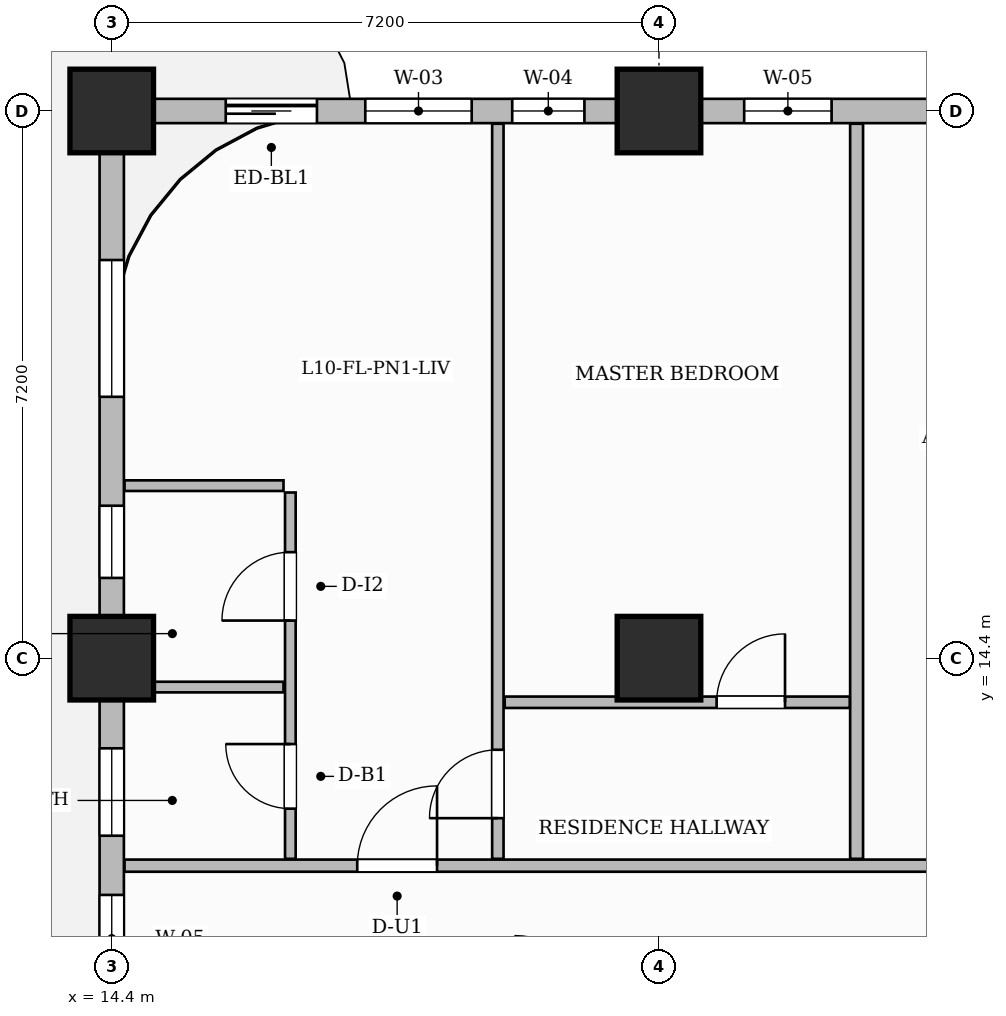
"""IFC4 building model, lengths in metres.
Left out: names, types, materials, properties, quantities, classifications, styles, units other than length and angle.
Written with IfcOpenShell. Run it as: python <this file> out.ifc"""

import sys

from ifc_helpers import new_model, si_unit, direction, frame, frame_2d, origin, origin_2d, place, context, subcontext, project, spatial, rectangle, extrude, source, transform, mapped, element, fill, save


model = new_model("IFC4")
c1 = context("Model", 3, precision=1e-05, world=origin(), true_north=direction((0.0, 1.0)))
c2 = subcontext(c1, "Body", "Model", "MODEL_VIEW")
j1 = project(units=[si_unit("LENGTHUNIT", "METRE"), si_unit("PLANEANGLEUNIT", "RADIAN")], contexts=[c1])
p1 = place(None, origin())
s1 = spatial("IfcSite", under=j1, at=p1, CompositionType="ELEMENT")
p2 = place(p1, origin())
s2 = spatial("IfcBuilding", under=s1, at=p2, CompositionType="ELEMENT")
p3 = place(p2, frame((0.0, 0.0, 47.2)))
s3 = spatial("IfcBuildingStorey", under=s2, at=p3, CompositionType="ELEMENT", Elevation=47.2)
m1 = source(origin(), c2, "Body", "SweptSolid", [
    extrude(rectangle(XDim=1.1, YDim=1.1, at=origin_2d()), origin(), (0.0, 0.0, 1.0), 3.7),
])
for number, where, z_axis, x_axis in (
    (1, (14.4, 14.4, 0.0), (0.0, 0.0, 1.0), (1.0, 0.0, 0.0)),
    (2, (14.4, 21.6, 0.0), (0.0, 0.0, 1.0), (1.0, 0.0, 0.0)),
    (3, (21.6, 14.4, 0.0), (0.0, 0.0, 1.0), (1.0, 0.0, 0.0)),
    (4, (21.6, 21.6, 0.0), (0.0, 0.0, 1.0), (1.0, 0.0, 0.0)),
):
    element("IfcColumn", number, at=place(p3, frame(where, z_axis=z_axis, x_axis=x_axis)), inside=s3, PredefinedType="COLUMN", context=c2, shape_type="MappedRepresentation", body=[
        mapped(m1, transform((0.0, 0.0, 0.0), scale=1.0)),
    ])
p4 = place(p3, frame((14.568, 11.67, 0.0), z_axis=(0.0, 0.0, 1.0), x_axis=(1.0, 0.0, 0.0)))
e5 = element("IfcWall", 5, at=p4, inside=s3, PredefinedType="PARTITIONING", context=c2, shape_type="SweptSolid", body=[
    extrude(rectangle(XDim=15.542, YDim=0.16, at=frame_2d((7.771, 0.0))), origin(), (0.0, 0.0, 1.0), 3.45),
])
p5 = place(p4, frame((3.062, 0.0, 0.0)))
e6 = element("IfcOpeningElement", 6, at=p5, cuts=e5, PredefinedType="OPENING", context=c2, shape_type="SweptSolid", body=[
    extrude(rectangle(XDim=1.05, YDim=2.25, at=frame_2d((0.525, 1.125))), frame((0.0, 0.09, 0.0), z_axis=(0.0, -1.0, 0.0), x_axis=(1.0, 0.0, 0.0)), (0.0, 0.0, 1.0), 0.18),
])
p6 = place(p4, frame((11.932, 0.0, 0.0)))
e7 = element("IfcOpeningElement", 7, at=p6, cuts=e5, PredefinedType="OPENING", context=c2, shape_type="SweptSolid", body=[
    extrude(rectangle(XDim=1.4, YDim=2.35, at=frame_2d((0.7, 1.175))), frame((0.0, 0.09, 0.0), z_axis=(0.0, -1.0, 0.0), x_axis=(1.0, 0.0, 0.0)), (0.0, 0.0, 1.0), 0.18),
])
p7 = place(p3, frame((24.2, 11.76, 0.0), z_axis=(0.0, 0.0, 1.0), x_axis=(0.0, 1.0, 0.0)))
e8 = element("IfcWall", 8, at=p7, inside=s3, PredefinedType="PARTITIONING", context=c2, shape_type="SweptSolid", body=[
    extrude(rectangle(XDim=9.672, YDim=0.17, at=frame_2d((4.836, 0.0))), origin(), (0.0, 0.0, 1.0), 3.45),
])
p8 = place(p3, frame((16.75, 11.76, 0.0), z_axis=(0.0, 0.0, 1.0), x_axis=(0.0, 1.0, 0.0)))
e9 = element("IfcWall", 9, at=p8, inside=s3, PredefinedType="PARTITIONING", context=c2, shape_type="SweptSolid", body=[
    extrude(rectangle(XDim=4.82, YDim=0.14, at=frame_2d((2.41, 0.0))), origin(), (0.0, 0.0, 1.0), 3.45),
])
p9 = place(p8, frame((0.66, 0.0, 0.0)))
e10 = element("IfcOpeningElement", 10, at=p9, cuts=e9, PredefinedType="OPENING", context=c2, shape_type="SweptSolid", body=[
    extrude(rectangle(XDim=0.85, YDim=2.1, at=frame_2d((0.425, 1.05))), frame((0.0, 0.08, 0.0), z_axis=(0.0, -1.0, 0.0), x_axis=(1.0, 0.0, 0.0)), (0.0, 0.0, 1.0), 0.16),
])
p10 = place(p8, frame((3.135, 0.0, 0.0)))
e11 = element("IfcOpeningElement", 11, at=p10, cuts=e9, PredefinedType="OPENING", context=c2, shape_type="SweptSolid", body=[
    extrude(rectangle(XDim=0.9, YDim=2.15, at=frame_2d((0.45, 1.075))), frame((0.0, 0.08, 0.0), z_axis=(0.0, -1.0, 0.0), x_axis=(1.0, 0.0, 0.0)), (0.0, 0.0, 1.0), 0.16),
])
p11 = place(p3, frame((14.59, 14.02, 0.0), z_axis=(0.0, 0.0, 1.0), x_axis=(1.0, 0.0, 0.0)))
e12 = element("IfcWall", 12, at=p11, inside=s3, PredefinedType="PARTITIONING", context=c2, shape_type="SweptSolid", body=[
    extrude(rectangle(XDim=2.07, YDim=0.14, at=frame_2d((1.035, 0.0))), origin(), (0.0, 0.0, 1.0), 3.45),
])
p12 = place(p3, frame((14.568, 16.67, 0.0), z_axis=(0.0, 0.0, 1.0), x_axis=(1.0, 0.0, 0.0)))
e13 = element("IfcWall", 13, at=p12, inside=s3, PredefinedType="PARTITIONING", context=c2, shape_type="SweptSolid", body=[
    extrude(rectangle(XDim=2.092, YDim=0.14, at=frame_2d((1.046, 0.0))), origin(), (0.0, 0.0, 1.0), 3.45),
])
p13 = place(p3, frame((19.48, 11.76, 0.0), z_axis=(0.0, 0.0, 1.0), x_axis=(0.0, 1.0, 0.0)))
e14 = element("IfcWall", 14, at=p13, inside=s3, PredefinedType="PARTITIONING", context=c2, shape_type="SweptSolid", body=[
    extrude(rectangle(XDim=9.672, YDim=0.15, at=frame_2d((4.836, 0.0))), origin(), (0.0, 0.0, 1.0), 3.45),
])
p14 = place(p13, frame((0.535, 0.0, 0.0)))
e15 = element("IfcOpeningElement", 15, at=p14, cuts=e14, PredefinedType="OPENING", context=c2, shape_type="SweptSolid", body=[
    extrude(rectangle(XDim=0.9, YDim=2.15, at=frame_2d((0.45, 1.075))), frame((0.0, 0.085, 0.0), z_axis=(0.0, -1.0, 0.0), x_axis=(1.0, 0.0, 0.0)), (0.0, 0.0, 1.0), 0.17),
])
p15 = place(p3, frame((19.57, 13.82, 0.0), z_axis=(0.0, 0.0, 1.0), x_axis=(1.0, 0.0, 0.0)))
e16 = element("IfcWall", 16, at=p15, inside=s3, PredefinedType="PARTITIONING", context=c2, shape_type="SweptSolid", body=[
    extrude(rectangle(XDim=4.54, YDim=0.15, at=frame_2d((2.27, 0.0))), origin(), (0.0, 0.0, 1.0), 3.45),
])
p16 = place(p15, frame((2.788, 0.0, 0.0)))
e17 = element("IfcOpeningElement", 17, at=p16, cuts=e16, PredefinedType="OPENING", context=c2, shape_type="SweptSolid", body=[
    extrude(rectangle(XDim=0.9, YDim=2.15, at=frame_2d((0.45, 1.075))), frame((0.0, 0.085, 0.0), z_axis=(0.0, -1.0, 0.0), x_axis=(1.0, 0.0, 0.0)), (0.0, 0.0, 1.0), 0.17),
])
p17 = place(p3, frame((14.4, 21.6, 0.0), z_axis=(0.0, 0.0, 1.0), x_axis=(1.0, 0.0, 0.0)))
e18 = element("IfcWall", 18, at=p17, inside=s3, PredefinedType="SOLIDWALL", context=c2, shape_type="SweptSolid", body=[
    extrude(rectangle(XDim=43.2, YDim=0.32, at=frame_2d((21.6, 0.0))), origin(), (0.0, 0.0, 1.0), 2.885),
])
p18 = place(p17, frame((1.5, 0.0, 0.0)))
e19 = element("IfcOpeningElement", 19, at=p18, cuts=e18, PredefinedType="OPENING", context=c2, shape_type="SweptSolid", body=[
    extrude(rectangle(XDim=1.2, YDim=2.2, at=frame_2d((0.6, 1.1))), frame((0.0, 0.17, 0.0), z_axis=(0.0, -1.0, 0.0), x_axis=(1.0, 0.0, 0.0)), (0.0, 0.0, 1.0), 0.34),
])
p19 = place(p17, frame((3.336, 0.0, 0.8)))
e20 = element("IfcOpeningElement", 20, at=p19, cuts=e18, PredefinedType="OPENING", context=c2, shape_type="SweptSolid", body=[
    extrude(rectangle(XDim=1.4, YDim=1.85, at=frame_2d((0.7, 0.925))), frame((0.0, 0.17, 0.0), z_axis=(0.0, -1.0, 0.0), x_axis=(1.0, 0.0, 0.0)), (0.0, 0.0, 1.0), 0.34),
])
p20 = place(p17, frame((5.269, 0.0, 0.8)))
e21 = element("IfcOpeningElement", 21, at=p20, cuts=e18, PredefinedType="OPENING", context=c2, shape_type="SweptSolid", body=[
    extrude(rectangle(XDim=0.95, YDim=1.75, at=frame_2d((0.475, 0.875))), frame((0.0, 0.17, 0.0), z_axis=(0.0, -1.0, 0.0), x_axis=(1.0, 0.0, 0.0)), (0.0, 0.0, 1.0), 0.34),
])
p21 = place(p17, frame((8.321, 0.0, 0.8)))
e22 = element("IfcOpeningElement", 22, at=p21, cuts=e18, PredefinedType="OPENING", context=c2, shape_type="SweptSolid", body=[
    extrude(rectangle(XDim=1.15, YDim=1.8, at=frame_2d((0.575, 0.9))), frame((0.0, 0.17, 0.0), z_axis=(0.0, -1.0, 0.0), x_axis=(1.0, 0.0, 0.0)), (0.0, 0.0, 1.0), 0.34),
])
p22 = place(p17, frame((10.804, 0.0, 0.8)))
e23 = element("IfcOpeningElement", 23, at=p22, cuts=e18, PredefinedType="OPENING", context=c2, shape_type="SweptSolid", body=[
    extrude(rectangle(XDim=1.8, YDim=1.85, at=frame_2d((0.9, 0.925))), frame((0.0, 0.17, 0.0), z_axis=(0.0, -1.0, 0.0), x_axis=(1.0, 0.0, 0.0)), (0.0, 0.0, 1.0), 0.34),
])
p23 = place(p17, frame((16.601, 0.0, 0.8)))
e24 = element("IfcOpeningElement", 24, at=p23, cuts=e18, PredefinedType="OPENING", context=c2, shape_type="SweptSolid", body=[
    extrude(rectangle(XDim=1.8, YDim=1.85, at=frame_2d((0.9, 0.925))), frame((0.0, 0.17, 0.0), z_axis=(0.0, -1.0, 0.0), x_axis=(1.0, 0.0, 0.0)), (0.0, 0.0, 1.0), 0.34),
])
p24 = place(p17, frame((21.723, 0.0, 0.8)))
e25 = element("IfcOpeningElement", 25, at=p24, cuts=e18, PredefinedType="OPENING", context=c2, shape_type="SweptSolid", body=[
    extrude(rectangle(XDim=1.8, YDim=1.85, at=frame_2d((0.9, 0.925))), frame((0.0, 0.17, 0.0), z_axis=(0.0, -1.0, 0.0), x_axis=(1.0, 0.0, 0.0)), (0.0, 0.0, 1.0), 0.34),
])
p25 = place(p17, frame((24.469, 0.0, 0.8)))
e26 = element("IfcOpeningElement", 26, at=p25, cuts=e18, PredefinedType="OPENING", context=c2, shape_type="SweptSolid", body=[
    extrude(rectangle(XDim=1.8, YDim=1.85, at=frame_2d((0.9, 0.925))), frame((0.0, 0.17, 0.0), z_axis=(0.0, -1.0, 0.0), x_axis=(1.0, 0.0, 0.0)), (0.0, 0.0, 1.0), 0.34),
])
p26 = place(p17, frame((29.075, 0.0, 0.8)))
e27 = element("IfcOpeningElement", 27, at=p26, cuts=e18, PredefinedType="OPENING", context=c2, shape_type="SweptSolid", body=[
    extrude(rectangle(XDim=1.8, YDim=1.85, at=frame_2d((0.9, 0.925))), frame((0.0, 0.17, 0.0), z_axis=(0.0, -1.0, 0.0), x_axis=(1.0, 0.0, 0.0)), (0.0, 0.0, 1.0), 0.34),
])
p27 = place(p17, frame((32.125, 0.0, 0.8)))
e28 = element("IfcOpeningElement", 28, at=p27, cuts=e18, PredefinedType="OPENING", context=c2, shape_type="SweptSolid", body=[
    extrude(rectangle(XDim=1.8, YDim=1.85, at=frame_2d((0.9, 0.925))), frame((0.0, 0.17, 0.0), z_axis=(0.0, -1.0, 0.0), x_axis=(1.0, 0.0, 0.0)), (0.0, 0.0, 1.0), 0.34),
])
p28 = place(p17, frame((36.875, 0.0, 0.8)))
e29 = element("IfcOpeningElement", 29, at=p28, cuts=e18, PredefinedType="OPENING", context=c2, shape_type="SweptSolid", body=[
    extrude(rectangle(XDim=1.8, YDim=1.85, at=frame_2d((0.9, 0.925))), frame((0.0, 0.17, 0.0), z_axis=(0.0, -1.0, 0.0), x_axis=(1.0, 0.0, 0.0)), (0.0, 0.0, 1.0), 0.34),
])
p29 = place(p17, frame((39.925, 0.0, 0.8)))
e30 = element("IfcOpeningElement", 30, at=p29, cuts=e18, PredefinedType="OPENING", context=c2, shape_type="SweptSolid", body=[
    extrude(rectangle(XDim=1.8, YDim=1.85, at=frame_2d((0.9, 0.925))), frame((0.0, 0.17, 0.0), z_axis=(0.0, -1.0, 0.0), x_axis=(1.0, 0.0, 0.0)), (0.0, 0.0, 1.0), 0.34),
])
p30 = place(p3, frame((14.4, 0.05, 0.0), z_axis=(0.0, 0.0, 1.0), x_axis=(0.0, 1.0, 0.0)))
e31 = element("IfcWall", 31, at=p30, inside=s3, PredefinedType="SOLIDWALL", context=c2, shape_type="SweptSolid", body=[
    extrude(rectangle(XDim=21.5, YDim=0.32, at=frame_2d((10.75, 0.0))), origin(), (0.0, 0.0, 1.0), 2.885),
])
p31 = place(p30, frame((1.275, 0.0, 0.8)))
e32 = element("IfcOpeningElement", 32, at=p31, cuts=e31, PredefinedType="OPENING", context=c2, shape_type="SweptSolid", body=[
    extrude(rectangle(XDim=1.8, YDim=1.85, at=frame_2d((0.9, 0.925))), frame((0.0, 0.17, 0.0), z_axis=(0.0, -1.0, 0.0), x_axis=(1.0, 0.0, 0.0)), (0.0, 0.0, 1.0), 0.34),
])
p32 = place(p30, frame((4.025, 0.0, 0.8)))
e33 = element("IfcOpeningElement", 33, at=p32, cuts=e31, PredefinedType="OPENING", context=c2, shape_type="SweptSolid", body=[
    extrude(rectangle(XDim=1.8, YDim=1.85, at=frame_2d((0.9, 0.925))), frame((0.0, 0.17, 0.0), z_axis=(0.0, -1.0, 0.0), x_axis=(1.0, 0.0, 0.0)), (0.0, 0.0, 1.0), 0.34),
])
p33 = place(p30, frame((8.246, 0.0, 0.8)))
e34 = element("IfcOpeningElement", 34, at=p33, cuts=e31, PredefinedType="OPENING", context=c2, shape_type="SweptSolid", body=[
    extrude(rectangle(XDim=1.15, YDim=1.8, at=frame_2d((0.575, 0.9))), frame((0.0, 0.17, 0.0), z_axis=(0.0, -1.0, 0.0), x_axis=(1.0, 0.0, 0.0)), (0.0, 0.0, 1.0), 0.34),
])
p34 = place(p30, frame((10.085, 0.0, 0.8)))
e35 = element("IfcOpeningElement", 35, at=p34, cuts=e31, PredefinedType="OPENING", context=c2, shape_type="SweptSolid", body=[
    extrude(rectangle(XDim=1.15, YDim=1.8, at=frame_2d((0.575, 0.9))), frame((0.0, 0.17, 0.0), z_axis=(0.0, -1.0, 0.0), x_axis=(1.0, 0.0, 0.0)), (0.0, 0.0, 1.0), 0.34),
])
p35 = place(p30, frame((12.014, 0.0, 0.8)))
e36 = element("IfcOpeningElement", 36, at=p35, cuts=e31, PredefinedType="OPENING", context=c2, shape_type="SweptSolid", body=[
    extrude(rectangle(XDim=1.15, YDim=1.8, at=frame_2d((0.575, 0.9))), frame((0.0, 0.17, 0.0), z_axis=(0.0, -1.0, 0.0), x_axis=(1.0, 0.0, 0.0)), (0.0, 0.0, 1.0), 0.34),
])
p36 = place(p30, frame((15.406, 0.0, 0.8)))
e37 = element("IfcOpeningElement", 37, at=p36, cuts=e31, PredefinedType="OPENING", context=c2, shape_type="SweptSolid", body=[
    extrude(rectangle(XDim=0.95, YDim=1.75, at=frame_2d((0.475, 0.875))), frame((0.0, 0.17, 0.0), z_axis=(0.0, -1.0, 0.0), x_axis=(1.0, 0.0, 0.0)), (0.0, 0.0, 1.0), 0.34),
])
p37 = place(p30, frame((17.789, 0.0, 0.8)))
e38 = element("IfcOpeningElement", 38, at=p37, cuts=e31, PredefinedType="OPENING", context=c2, shape_type="SweptSolid", body=[
    extrude(rectangle(XDim=1.8, YDim=1.85, at=frame_2d((0.9, 0.925))), frame((0.0, 0.17, 0.0), z_axis=(0.0, -1.0, 0.0), x_axis=(1.0, 0.0, 0.0)), (0.0, 0.0, 1.0), 0.34),
])
m2 = source(origin(), c2, "Body", "SweptSolid", [
    extrude(rectangle(XDim=0.85, YDim=2.1, at=frame_2d((0.425, 1.05))), frame((0.0, 0.025, 0.0), z_axis=(0.0, -1.0, 0.0), x_axis=(1.0, 0.0, 0.0)), (0.0, 0.0, 1.0), 0.05),
])
p38 = place(p9, origin())
e39 = element("IfcDoor", 39, at=p38, inside=s3, OperationType="SINGLE_SWING_RIGHT", PredefinedType="DOOR", context=c2, shape_type="MappedRepresentation", body=[
    mapped(m2, transform((0.0, 0.0, 0.0), scale=1.0)),
])
fill(e10, e39)
m3 = source(origin(), c2, "Body", "SweptSolid", [
    extrude(rectangle(XDim=0.9, YDim=2.15, at=frame_2d((0.45, 1.075))), frame((0.0, 0.025, 0.0), z_axis=(0.0, -1.0, 0.0), x_axis=(1.0, 0.0, 0.0)), (0.0, 0.0, 1.0), 0.05),
])
p39 = place(p10, origin())
e40 = element("IfcDoor", 40, at=p39, inside=s3, OperationType="SINGLE_SWING_LEFT", PredefinedType="DOOR", context=c2, shape_type="MappedRepresentation", body=[
    mapped(m3, transform((0.0, 0.0, 0.0), scale=1.0)),
])
fill(e11, e40)
m4 = source(origin(), c2, "Body", "SweptSolid", [
    extrude(rectangle(XDim=1.05, YDim=2.25, at=frame_2d((0.525, 1.125))), frame((0.0, 0.025, 0.0), z_axis=(0.0, -1.0, 0.0), x_axis=(1.0, 0.0, 0.0)), (0.0, 0.0, 1.0), 0.05),
])
p40 = place(p5, origin())
e41 = element("IfcDoor", 41, at=p40, inside=s3, OperationType="SINGLE_SWING_RIGHT", PredefinedType="DOOR", context=c2, shape_type="MappedRepresentation", body=[
    mapped(m4, transform((0.0, 0.0, 0.0), scale=1.0)),
])
fill(e6, e41)
p41 = place(p14, origin())
e42 = element("IfcDoor", 42, at=p41, inside=s3, OperationType="SINGLE_SWING_LEFT", PredefinedType="DOOR", context=c2, shape_type="MappedRepresentation", body=[
    mapped(m3, transform((0.0, 0.0, 0.0), scale=1.0)),
])
fill(e15, e42)
p42 = place(p16, origin())
e43 = element("IfcDoor", 43, at=p42, inside=s3, OperationType="SINGLE_SWING_RIGHT", PredefinedType="DOOR", context=c2, shape_type="MappedRepresentation", body=[
    mapped(m3, transform((0.0, 0.0, 0.0), scale=1.0)),
])
fill(e17, e43)
m5 = source(origin(), c2, "Body", "SweptSolid", [
    extrude(rectangle(XDim=1.2, YDim=2.2, at=frame_2d((0.6, 1.1))), frame((0.0, 0.025, 0.0), z_axis=(0.0, -1.0, 0.0), x_axis=(1.0, 0.0, 0.0)), (0.0, 0.0, 1.0), 0.05),
])
p43 = place(p18, origin())
e44 = element("IfcDoor", 44, at=p43, inside=s3, OperationType="SLIDING_TO_LEFT", PredefinedType="DOOR", context=c2, shape_type="MappedRepresentation", body=[
    mapped(m5, transform((0.0, 0.0, 0.0), scale=1.0)),
])
fill(e19, e44)
m6 = source(origin(), c2, "Body", "SweptSolid", [
    extrude(rectangle(XDim=1.4, YDim=1.85, at=frame_2d((0.7, 0.925))), frame((0.0, 0.03, 0.0), z_axis=(0.0, -1.0, 0.0), x_axis=(1.0, 0.0, 0.0)), (0.0, 0.0, 1.0), 0.06),
])
p44 = place(p19, origin())
e45 = element("IfcWindow", 45, at=p44, inside=s3, PartitioningType="SINGLE_PANEL", PredefinedType="WINDOW", context=c2, shape_type="MappedRepresentation", body=[
    mapped(m6, transform((0.0, 0.0, 0.0), scale=1.0)),
])
fill(e20, e45)
m7 = source(origin(), c2, "Body", "SweptSolid", [
    extrude(rectangle(XDim=0.95, YDim=1.75, at=frame_2d((0.475, 0.875))), frame((0.0, 0.03, 0.0), z_axis=(0.0, -1.0, 0.0), x_axis=(1.0, 0.0, 0.0)), (0.0, 0.0, 1.0), 0.06),
])
p45 = place(p20, origin())
e46 = element("IfcWindow", 46, at=p45, inside=s3, PartitioningType="SINGLE_PANEL", PredefinedType="WINDOW", context=c2, shape_type="MappedRepresentation", body=[
    mapped(m7, transform((0.0, 0.0, 0.0), scale=1.0)),
])
fill(e21, e46)
m8 = source(origin(), c2, "Body", "SweptSolid", [
    extrude(rectangle(XDim=1.15, YDim=1.8, at=frame_2d((0.575, 0.9))), frame((0.0, 0.03, 0.0), z_axis=(0.0, -1.0, 0.0), x_axis=(1.0, 0.0, 0.0)), (0.0, 0.0, 1.0), 0.06),
])
p46 = place(p21, origin())
e47 = element("IfcWindow", 47, at=p46, inside=s3, PartitioningType="SINGLE_PANEL", PredefinedType="WINDOW", context=c2, shape_type="MappedRepresentation", body=[
    mapped(m8, transform((0.0, 0.0, 0.0), scale=1.0)),
])
fill(e22, e47)
p47 = place(p34, origin())
e48 = element("IfcWindow", 48, at=p47, inside=s3, PartitioningType="SINGLE_PANEL", PredefinedType="WINDOW", context=c2, shape_type="MappedRepresentation", body=[
    mapped(m8, transform((0.0, 0.0, 0.0), scale=1.0)),
])
fill(e35, e48)
p48 = place(p35, origin())
e49 = element("IfcWindow", 49, at=p48, inside=s3, PartitioningType="SINGLE_PANEL", PredefinedType="WINDOW", context=c2, shape_type="MappedRepresentation", body=[
    mapped(m8, transform((0.0, 0.0, 0.0), scale=1.0)),
])
fill(e36, e49)
p49 = place(p36, origin())
e50 = element("IfcWindow", 50, at=p49, inside=s3, PartitioningType="SINGLE_PANEL", PredefinedType="WINDOW", context=c2, shape_type="MappedRepresentation", body=[
    mapped(m7, transform((0.0, 0.0, 0.0), scale=1.0)),
])
fill(e37, e50)
m9 = source(origin(), c2, "Body", "SweptSolid", [
    extrude(rectangle(XDim=1.8, YDim=1.85, at=frame_2d((0.9, 0.925))), frame((0.0, 0.03, 0.0), z_axis=(0.0, -1.0, 0.0), x_axis=(1.0, 0.0, 0.0)), (0.0, 0.0, 1.0), 0.06),
])
p50 = place(p37, origin())
e51 = element("IfcWindow", 51, at=p50, inside=s3, PartitioningType="DOUBLE_PANEL_VERTICAL", PredefinedType="WINDOW", context=c2, shape_type="MappedRepresentation", body=[
    mapped(m9, transform((0.0, 0.0, 0.0), scale=1.0)),
])
fill(e38, e51)
save(model, sys.argv[1])
